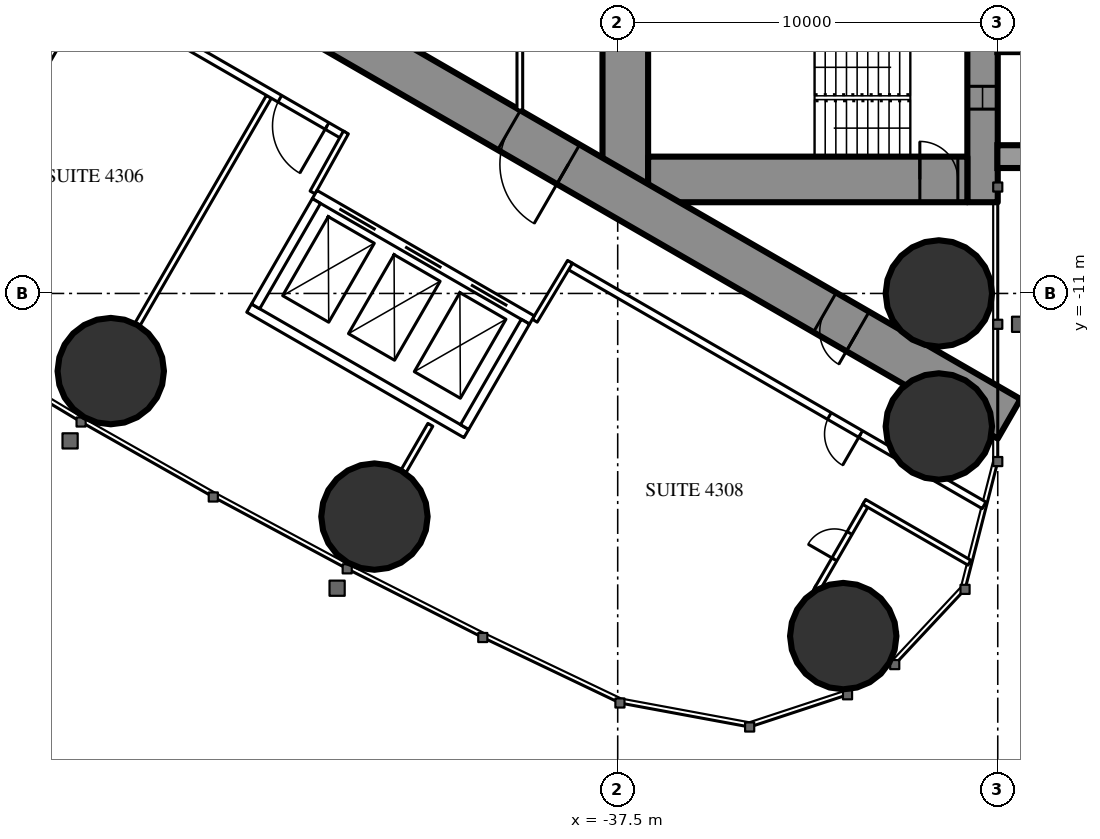
"""IFC4 building model, lengths in metres.
Left out: names, types, materials, properties, quantities, classifications, styles, units other than length and angle.
Written with IfcOpenShell. Run it as: python <this file> out.ifc"""

import sys

from ifc_helpers import new_model, si_unit, direction, frame, frame_2d, origin, origin_2d, place, context, subcontext, project, spatial, rectangle, circle, extrude, element, fill, save


model = new_model("IFC4")
c1 = context("Model", 3, precision=1e-05, world=origin(), true_north=direction((0.0, 1.0)))
c2 = subcontext(c1, "Body", "Model", "MODEL_VIEW")
j1 = project(units=[si_unit("LENGTHUNIT", "METRE"), si_unit("PLANEANGLEUNIT", "RADIAN")], contexts=[c1])
p1 = place(None, origin())
s1 = spatial("IfcSite", under=j1, at=p1, CompositionType="ELEMENT")
p2 = place(p1, origin())
s2 = spatial("IfcBuilding", under=s1, at=p2, CompositionType="ELEMENT")
p3 = place(p2, frame((0.0, 0.0, 163.3)))
s3 = spatial("IfcBuildingStorey", under=s2, at=p3, CompositionType="ELEMENT", Elevation=163.3)
for number, where, z_axis, x_axis in (
    (1, (-31.565, -20.016, 0.0), (0.0, 0.0, 1.0), (1.0, 0.0, 0.0)),
    (2, (-29.05, -11.0, 0.0), (0.0, 0.0, 1.0), (1.0, 0.0, 0.0)),
    (3, (-29.05, -14.5, 0.0), (0.0, 0.0, 1.0), (1.0, 0.0, 0.0)),
    (4, (-50.839, -13.043, 0.0), (0.0, 0.0, 1.0), (1.0, 0.0, 0.0)),
    (5, (-43.9, -16.871, 0.0), (0.0, 0.0, 1.0), (1.0, 0.0, 0.0)),
):
    element("IfcColumn", number, at=place(p3, frame(where, z_axis=z_axis, x_axis=x_axis)), inside=s3, PredefinedType="COLUMN", context=c2, shape_type="SweptSolid", body=[
        extrude(circle(Radius=1.4, at=origin_2d()), origin(), (0.0, 0.0, 1.0), 3.5),
    ])
p4 = place(p3, frame((-27.9, 8.6, 0.0), z_axis=(0.0, 0.0, 1.0), x_axis=(0.0, -1.0, 0.0)))
e6 = element("IfcWall", 6, at=p4, inside=s3, PredefinedType="SHEAR", context=c2, shape_type="SweptSolid", body=[
    extrude(rectangle(XDim=17.2, YDim=0.8, at=frame_2d((8.6, 0.0))), origin(), (0.0, 0.0, 1.0), 3.5),
])
p5 = place(p4, frame((2.45, 0.0, 0.6)))
e7 = element("IfcOpeningElement", 7, at=p5, cuts=e6, PredefinedType="OPENING", context=c2, shape_type="SweptSolid", body=[
    extrude(rectangle(XDim=0.6, YDim=2.1, at=frame_2d((0.3, 1.05))), frame((0.0, 0.41, 0.0), z_axis=(0.0, -1.0, 0.0), x_axis=(1.0, 0.0, 0.0)), (0.0, 0.0, 1.0), 0.82),
])
p6 = place(p4, frame((14.15, 0.0, 0.6)))
e8 = element("IfcOpeningElement", 8, at=p6, cuts=e6, PredefinedType="OPENING", context=c2, shape_type="SweptSolid", body=[
    extrude(rectangle(XDim=0.6, YDim=2.1, at=frame_2d((0.3, 1.05))), frame((0.0, 0.41, 0.0), z_axis=(0.0, -1.0, 0.0), x_axis=(1.0, 0.0, 0.0)), (0.0, 0.0, 1.0), 0.82),
])
p7 = place(p3, frame((-37.3, 8.6, 0.0), z_axis=(0.0, 0.0, 1.0), x_axis=(0.0, -1.0, 0.0)))
e9 = element("IfcWall", 9, at=p7, inside=s3, PredefinedType="SHEAR", context=c2, shape_type="SweptSolid", body=[
    extrude(rectangle(XDim=17.2, YDim=1.2, at=frame_2d((8.6, 0.0))), origin(), (0.0, 0.0, 1.0), 3.5),
])
p8 = place(p7, frame((7.7, 0.0, 0.0)))
e10 = element("IfcOpeningElement", 10, at=p8, cuts=e9, PredefinedType="OPENING", context=c2, shape_type="SweptSolid", body=[
    extrude(rectangle(XDim=1.8, YDim=2.2, at=frame_2d((0.9, 1.1))), frame((0.0, 0.61, 0.0), z_axis=(0.0, -1.0, 0.0), x_axis=(1.0, 0.0, 0.0)), (0.0, 0.0, 1.0), 1.22),
])
p9 = place(p3, frame((-28.3, -8.0, 0.0), z_axis=(0.0, 0.0, 1.0), x_axis=(-1.0, 0.0, 0.0)))
e11 = element("IfcWall", 11, at=p9, inside=s3, PredefinedType="SHEAR", context=c2, shape_type="SweptSolid", body=[
    extrude(rectangle(XDim=8.4, YDim=1.2, at=frame_2d((4.2, 0.0))), origin(), (0.0, 0.0, 1.0), 3.5),
])
p10 = place(p9, frame((0.25, 0.0, 0.0)))
e12 = element("IfcOpeningElement", 12, at=p10, cuts=e11, PredefinedType="OPENING", context=c2, shape_type="SweptSolid", body=[
    extrude(rectangle(XDim=1.0, YDim=2.2, at=frame_2d((0.5, 1.1))), frame((0.0, 0.61, 0.0), z_axis=(0.0, -1.0, 0.0), x_axis=(1.0, 0.0, 0.0)), (0.0, 0.0, 1.0), 1.22),
])
p11 = place(p3, frame((-27.2, -14.3, 0.0), z_axis=(0.0, 0.0, 1.0), x_axis=(-0.866024021859, 0.500002393557, 0.0)))
e13 = element("IfcWall", 13, at=p11, inside=s3, PredefinedType="SHEAR", context=c2, shape_type="SweptSolid", body=[
    extrude(rectangle(XDim=27.907, YDim=1.2, at=frame_2d((13.954, 0.0))), origin(), (0.0, 0.0, 1.0), 3.5),
])
p12 = place(p11, frame((4.6, 0.0, 0.0)))
e14 = element("IfcOpeningElement", 14, at=p12, cuts=e13, PredefinedType="OPENING", context=c2, shape_type="SweptSolid", body=[
    extrude(rectangle(XDim=1.0, YDim=2.2, at=frame_2d((0.5, 1.1))), frame((0.0, 0.61, 0.0), z_axis=(0.0, -1.0, 0.0), x_axis=(1.0, 0.0, 0.0)), (0.0, 0.0, 1.0), 1.22),
])
p13 = place(p11, frame((13.395, 0.0, 0.0)))
e15 = element("IfcOpeningElement", 15, at=p13, cuts=e13, PredefinedType="OPENING", context=c2, shape_type="SweptSolid", body=[
    extrude(rectangle(XDim=1.8, YDim=2.2, at=frame_2d((0.9, 1.1))), frame((0.0, 0.61, 0.0), z_axis=(0.0, -1.0, 0.0), x_axis=(1.0, 0.0, 0.0)), (0.0, 0.0, 1.0), 1.22),
])
p14 = place(p3, frame((-46.679, -5.825, 0.0), z_axis=(0.0, 0.0, 1.0), x_axis=(-0.500006839597, -0.866021454905, 0.0)))
e16 = element("IfcWall", 16, at=p14, inside=s3, PredefinedType="PARTITIONING", context=c2, shape_type="SweptSolid", body=[
    extrude(rectangle(XDim=6.911, YDim=0.15, at=frame_2d((3.456, 0.0))), origin(), (0.0, 0.0, 1.0), 2.3),
])
p15 = place(p3, frame((-42.429, -14.457, 0.0), z_axis=(0.0, 0.0, 1.0), x_axis=(-0.5000578829, -0.865991982497, 0.0)))
e17 = element("IfcWall", 17, at=p15, inside=s3, PredefinedType="PARTITIONING", context=c2, shape_type="SweptSolid", body=[
    extrude(rectangle(XDim=1.407, YDim=0.15, at=frame_2d((0.704, 0.0))), origin(), (0.0, 0.0, 1.0), 3.25),
])
p16 = place(p3, frame((-27.86, -16.575, 0.0), z_axis=(0.0, 0.0, 1.0), x_axis=(-0.866027756871, 0.499995924312, 0.0)))
e18 = element("IfcWall", 18, at=p16, inside=s3, PredefinedType="PARTITIONING", context=c2, shape_type="SweptSolid", body=[
    extrude(rectangle(XDim=12.622, YDim=0.2, at=frame_2d((6.311, 0.0))), origin(), (0.0, 0.0, 1.0), 3.25),
])
p17 = place(p16, frame((3.75, 0.0, 0.0)))
e19 = element("IfcOpeningElement", 19, at=p17, cuts=e18, PredefinedType="OPENING", context=c2, shape_type="SweptSolid", body=[
    extrude(rectangle(XDim=0.95, YDim=2.2, at=frame_2d((0.475, 1.1))), frame((0.0, 0.11, 0.0), z_axis=(0.0, -1.0, 0.0), x_axis=(1.0, 0.0, 0.0)), (0.0, 0.0, 1.0), 0.22),
])
p18 = place(p3, frame((-44.715, -6.844, 0.0), z_axis=(0.0, 0.0, 1.0), x_axis=(-0.866025261224, 0.500000246922, 0.0)))
e20 = element("IfcWall", 20, at=p18, inside=s3, PredefinedType="PARTITIONING", context=c2, shape_type="SweptSolid", body=[
    extrude(rectangle(XDim=13.567, YDim=0.2, at=frame_2d((6.783, 0.0))), origin(), (0.0, 0.0, 1.0), 3.25),
])
p19 = place(p18, frame((10.579, 0.0, 0.0)))
e21 = element("IfcOpeningElement", 21, at=p19, cuts=e20, PredefinedType="OPENING", context=c2, shape_type="SweptSolid", body=[
    extrude(rectangle(XDim=0.95, YDim=2.2, at=frame_2d((0.475, 1.1))), frame((0.0, 0.11, 0.0), z_axis=(0.0, -1.0, 0.0), x_axis=(1.0, 0.0, 0.0)), (0.0, 0.0, 1.0), 0.22),
])
p20 = place(p18, frame((8.879, 0.0, 0.0)))
e22 = element("IfcOpeningElement", 22, at=p20, cuts=e20, PredefinedType="OPENING", context=c2, shape_type="SweptSolid", body=[
    extrude(rectangle(XDim=0.95, YDim=2.2, at=frame_2d((0.475, 1.1))), frame((0.0, 0.11, 0.0), z_axis=(0.0, -1.0, 0.0), x_axis=(1.0, 0.0, 0.0)), (0.0, 0.0, 1.0), 0.22),
])
p21 = place(p18, frame((0.5, 0.0, 0.0)))
e23 = element("IfcOpeningElement", 23, at=p21, cuts=e20, PredefinedType="OPENING", context=c2, shape_type="SweptSolid", body=[
    extrude(rectangle(XDim=1.435, YDim=2.2, at=frame_2d((0.718, 1.1))), frame((0.0, 0.11, 0.0), z_axis=(0.0, -1.0, 0.0), x_axis=(1.0, 0.0, 0.0)), (0.0, 0.0, 1.0), 0.22),
])
for number, where, z_axis, x_axis in (
    (24, (-39.683, -11.718, 0.0), (0.0, 0.0, 1.0), (0.514, 0.858, 0.0)),
    (25, (-44.652, -6.764, 0.0), (0.0, 0.0, 1.0), (-0.485, -0.874, 0.0)),
):
    element("IfcWall", number, at=place(p3, frame(where, z_axis=z_axis, x_axis=x_axis)), inside=s3, PredefinedType="PARTITIONING", context=c2, shape_type="SweptSolid", body=[
        extrude(rectangle(XDim=1.805, YDim=0.15, at=frame_2d((0.903, 0.0))), origin(), (0.0, 0.0, 1.0), 3.25),
    ])
p22 = place(p3, frame((-52.159, -4.278, 0.0), z_axis=(0.0, 0.0, 1.0), x_axis=(-0.500047596559, -0.865997922154, 0.0)))
e26 = element("IfcWall", 26, at=p22, inside=s3, PredefinedType="PARTITIONING", context=c2, shape_type="SweptSolid", body=[
    extrude(rectangle(XDim=2.6, YDim=0.15, at=frame_2d((1.3, 0.0))), origin(), (0.0, 0.0, 1.0), 3.25),
])
p23 = place(p22, frame((0.9, 0.0, 0.0)))
e27 = element("IfcOpeningElement", 27, at=p23, cuts=e26, PredefinedType="OPENING", context=c2, shape_type="SweptSolid", body=[
    extrude(rectangle(XDim=0.8, YDim=2.2, at=frame_2d((0.4, 1.1))), frame((0.0, 0.085, 0.0), z_axis=(0.0, -1.0, 0.0), x_axis=(1.0, 0.0, 0.0)), (0.0, 0.0, 1.0), 0.17),
])
p24 = place(p3, frame((-30.17, -19.975, 0.0), z_axis=(0.0, 0.0, 1.0), x_axis=(-0.866006523861, 0.500032699561, 0.0)))
e28 = element("IfcWall", 28, at=p24, inside=s3, PredefinedType="PARTITIONING", context=c2, shape_type="SweptSolid", body=[
    extrude(rectangle(XDim=2.475, YDim=0.15, at=frame_2d((1.237, 0.0))), origin(), (0.0, 0.0, 1.0), 3.25),
])
p25 = place(p3, frame((-30.948, -16.524, 0.0), z_axis=(0.0, 0.0, 1.0), x_axis=(-0.500006934395, -0.866021400173, 0.0)))
e29 = element("IfcWall", 29, at=p25, inside=s3, PredefinedType="PARTITIONING", context=c2, shape_type="SweptSolid", body=[
    extrude(rectangle(XDim=2.6, YDim=0.15, at=frame_2d((1.3, 0.0))), origin(), (0.0, 0.0, 1.0), 2.3),
])
p26 = place(p25, frame((0.9, 0.0, 0.0)))
e30 = element("IfcOpeningElement", 30, at=p26, cuts=e29, PredefinedType="OPENING", context=c2, shape_type="SweptSolid", body=[
    extrude(rectangle(XDim=0.8, YDim=2.2, at=frame_2d((0.4, 1.1))), frame((0.0, 0.085, 0.0), z_axis=(0.0, -1.0, 0.0), x_axis=(1.0, 0.0, 0.0)), (0.0, 0.0, 1.0), 0.17),
])
p27 = place(p3, frame((-28.246, -18.084, 0.0), z_axis=(0.0, 0.0, 1.0), x_axis=(-0.866029063467, 0.49999366119, 0.0)))
e31 = element("IfcWall", 31, at=p27, inside=s3, PredefinedType="PARTITIONING", context=c2, shape_type="SweptSolid", body=[
    extrude(rectangle(XDim=3.195, YDim=0.15, at=frame_2d((1.597, 0.0))), origin(), (0.0, 0.0, 1.0), 3.25),
])
p28 = place(p3, frame((-40.075, 1.2, 0.0), z_axis=(0.0, 0.0, 1.0), x_axis=(0.0, -1.0, 0.0)))
e32 = element("IfcWall", 32, at=p28, inside=s3, PredefinedType="PARTITIONING", context=c2, shape_type="SweptSolid", body=[
    extrude(rectangle(XDim=7.374, YDim=0.15, at=frame_2d((3.687, 0.0))), origin(), (0.0, 0.0, 1.0), 3.25),
])
p29 = place(p28, frame((2.787, 0.0, 0.0)))
e33 = element("IfcOpeningElement", 33, at=p29, cuts=e32, PredefinedType="OPENING", context=c2, shape_type="SweptSolid", body=[
    extrude(rectangle(XDim=1.8, YDim=2.2, at=frame_2d((0.9, 1.1))), frame((0.0, 0.085, 0.0), z_axis=(0.0, -1.0, 0.0), x_axis=(1.0, 0.0, 0.0)), (0.0, 0.0, 1.0), 0.17),
])
p30 = place(p3, frame((-39.758, -11.697, 0.0), z_axis=(0.0, 0.0, 1.0), x_axis=(-0.866024194504, 0.500002094529, 0.0)))
e34 = element("IfcWall", 34, at=p30, inside=s3, PredefinedType="PARTITIONING", context=c2, shape_type="SweptSolid", body=[
    extrude(rectangle(XDim=6.6, YDim=0.25, at=frame_2d((3.3, 0.0))), origin(), (0.0, 0.0, 1.0), 3.25),
])
p31 = place(p30, frame((0.75, 0.0, 0.0)))
e35 = element("IfcOpeningElement", 35, at=p31, cuts=e34, PredefinedType="OPENING", context=c2, shape_type="SweptSolid", body=[
    extrude(rectangle(XDim=1.1, YDim=2.2, at=frame_2d((0.55, 1.1))), frame((0.0, 0.135, 0.0), z_axis=(0.0, -1.0, 0.0), x_axis=(1.0, 0.0, 0.0)), (0.0, 0.0, 1.0), 0.27),
])
p32 = place(p30, frame((2.75, 0.0, 0.0)))
e36 = element("IfcOpeningElement", 36, at=p32, cuts=e34, PredefinedType="OPENING", context=c2, shape_type="SweptSolid", body=[
    extrude(rectangle(XDim=1.1, YDim=2.2, at=frame_2d((0.55, 1.1))), frame((0.0, 0.135, 0.0), z_axis=(0.0, -1.0, 0.0), x_axis=(1.0, 0.0, 0.0)), (0.0, 0.0, 1.0), 0.27),
])
p33 = place(p30, frame((4.75, 0.0, 0.0)))
e37 = element("IfcOpeningElement", 37, at=p33, cuts=e34, PredefinedType="OPENING", context=c2, shape_type="SweptSolid", body=[
    extrude(rectangle(XDim=1.1, YDim=2.2, at=frame_2d((0.55, 1.1))), frame((0.0, 0.135, 0.0), z_axis=(0.0, -1.0, 0.0), x_axis=(1.0, 0.0, 0.0)), (0.0, 0.0, 1.0), 0.27),
])
p34 = place(p3, frame((-41.482, -14.686, 0.0), z_axis=(0.0, 0.0, 1.0), x_axis=(-0.86603344179, 0.499986077507, 0.0)))
e38 = element("IfcWall", 38, at=p34, inside=s3, PredefinedType="PARTITIONING", context=c2, shape_type="SweptSolid", body=[
    extrude(rectangle(XDim=6.6, YDim=0.25, at=frame_2d((3.3, 0.0))), origin(), (0.0, 0.0, 1.0), 3.25),
])
for number, where, z_axis, x_axis in (
    (39, (-39.928, -11.743, 0.0), (0.0, 0.0, 1.0), (-0.5, -0.866, 0.0)),
    (40, (-45.428, -8.568, 0.0), (0.0, 0.0, 1.0), (-0.5, -0.866, 0.0)),
):
    element("IfcWall", number, at=place(p3, frame(where, z_axis=z_axis, x_axis=x_axis)), inside=s3, PredefinedType="PARTITIONING", context=c2, shape_type="SweptSolid", body=[
        extrude(rectangle(XDim=3.201, YDim=0.25, at=frame_2d((1.6, 0.0))), origin(), (0.0, 0.0, 1.0), 3.25),
    ])
p35 = place(p26, origin())
e41 = element("IfcDoor", 41, at=p35, inside=s3, OperationType="SINGLE_SWING_RIGHT", PredefinedType="DOOR", context=c2, shape_type="SweptSolid", body=[
    extrude(rectangle(XDim=0.8, YDim=2.2, at=frame_2d((0.4, 1.1))), frame((0.0, 0.025, 0.0), z_axis=(0.0, -1.0, 0.0), x_axis=(1.0, 0.0, 0.0)), (0.0, 0.0, 1.0), 0.05),
])
fill(e30, e41)
p36 = place(p17, origin())
e42 = element("IfcDoor", 42, at=p36, inside=s3, OperationType="SINGLE_SWING_LEFT", PredefinedType="DOOR", context=c2, shape_type="SweptSolid", body=[
    extrude(rectangle(XDim=0.95, YDim=2.2, at=frame_2d((0.475, 1.1))), frame((0.0, 0.025, 0.0), z_axis=(0.0, -1.0, 0.0), x_axis=(1.0, 0.0, 0.0)), (0.0, 0.0, 1.0), 0.05),
])
fill(e19, e42)
p37 = place(p21, origin())
e43 = element("IfcDoor", 43, at=p37, inside=s3, OperationType="SINGLE_SWING_LEFT", PredefinedType="DOOR", context=c2, shape_type="SweptSolid", body=[
    extrude(rectangle(XDim=1.435, YDim=2.2, at=frame_2d((0.718, 1.1))), frame((0.0, 0.025, 0.0), z_axis=(0.0, -1.0, 0.0), x_axis=(1.0, 0.0, 0.0)), (0.0, 0.0, 1.0), 0.05),
])
fill(e23, e43)
p38 = place(p12, origin())
e44 = element("IfcDoor", 44, at=p38, inside=s3, OperationType="SINGLE_SWING_LEFT", PredefinedType="DOOR", context=c2, shape_type="SweptSolid", body=[
    extrude(rectangle(XDim=1.0, YDim=2.2, at=frame_2d((0.5, 1.1))), frame((0.0, 0.025, 0.0), z_axis=(0.0, -1.0, 0.0), x_axis=(1.0, 0.0, 0.0)), (0.0, 0.0, 1.0), 0.05),
])
fill(e14, e44)
p39 = place(p13, origin())
e45 = element("IfcDoor", 45, at=p39, inside=s3, OperationType="DOUBLE_DOOR_SINGLE_SWING", PredefinedType="DOOR", context=c2, shape_type="SweptSolid", body=[
    extrude(rectangle(XDim=1.8, YDim=2.2, at=frame_2d((0.9, 1.1))), frame((0.0, 0.025, 0.0), z_axis=(0.0, -1.0, 0.0), x_axis=(1.0, 0.0, 0.0)), (0.0, 0.0, 1.0), 0.05),
])
fill(e15, e45)
p40 = place(p10, origin())
e46 = element("IfcDoor", 46, at=p40, inside=s3, OperationType="SINGLE_SWING_RIGHT", PredefinedType="DOOR", context=c2, shape_type="SweptSolid", body=[
    extrude(rectangle(XDim=1.0, YDim=2.2, at=frame_2d((0.5, 1.1))), frame((0.0, 0.025, 0.0), z_axis=(0.0, -1.0, 0.0), x_axis=(1.0, 0.0, 0.0)), (0.0, 0.0, 1.0), 0.05),
])
fill(e12, e46)
p41 = place(p31, origin())
e47 = element("IfcDoor", 47, at=p41, inside=s3, OperationType="DOUBLE_DOOR_SLIDING", PredefinedType="USERDEFINED", context=c2, shape_type="SweptSolid", body=[
    extrude(rectangle(XDim=1.1, YDim=2.2, at=frame_2d((0.55, 1.1))), frame((0.0, 0.025, 0.0), z_axis=(0.0, -1.0, 0.0), x_axis=(1.0, 0.0, 0.0)), (0.0, 0.0, 1.0), 0.05),
])
fill(e35, e47)
p42 = place(p32, origin())
e48 = element("IfcDoor", 48, at=p42, inside=s3, OperationType="DOUBLE_DOOR_SLIDING", PredefinedType="USERDEFINED", context=c2, shape_type="SweptSolid", body=[
    extrude(rectangle(XDim=1.1, YDim=2.2, at=frame_2d((0.55, 1.1))), frame((0.0, 0.025, 0.0), z_axis=(0.0, -1.0, 0.0), x_axis=(1.0, 0.0, 0.0)), (0.0, 0.0, 1.0), 0.05),
])
fill(e36, e48)
p43 = place(p33, origin())
e49 = element("IfcDoor", 49, at=p43, inside=s3, OperationType="DOUBLE_DOOR_SLIDING", PredefinedType="USERDEFINED", context=c2, shape_type="SweptSolid", body=[
    extrude(rectangle(XDim=1.1, YDim=2.2, at=frame_2d((0.55, 1.1))), frame((0.0, 0.025, 0.0), z_axis=(0.0, -1.0, 0.0), x_axis=(1.0, 0.0, 0.0)), (0.0, 0.0, 1.0), 0.05),
])
fill(e37, e49)
p44 = place(p6, origin())
e50 = element("IfcWindow", 50, at=p44, inside=s3, PartitioningType="SINGLE_PANEL", PredefinedType="WINDOW", context=c2, shape_type="SweptSolid", body=[
    extrude(rectangle(XDim=0.6, YDim=2.1, at=frame_2d((0.3, 1.05))), frame((0.0, 0.03, 0.0), z_axis=(0.0, -1.0, 0.0), x_axis=(1.0, 0.0, 0.0)), (0.0, 0.0, 1.0), 0.06),
])
fill(e8, e50)
save(model, sys.argv[1])
